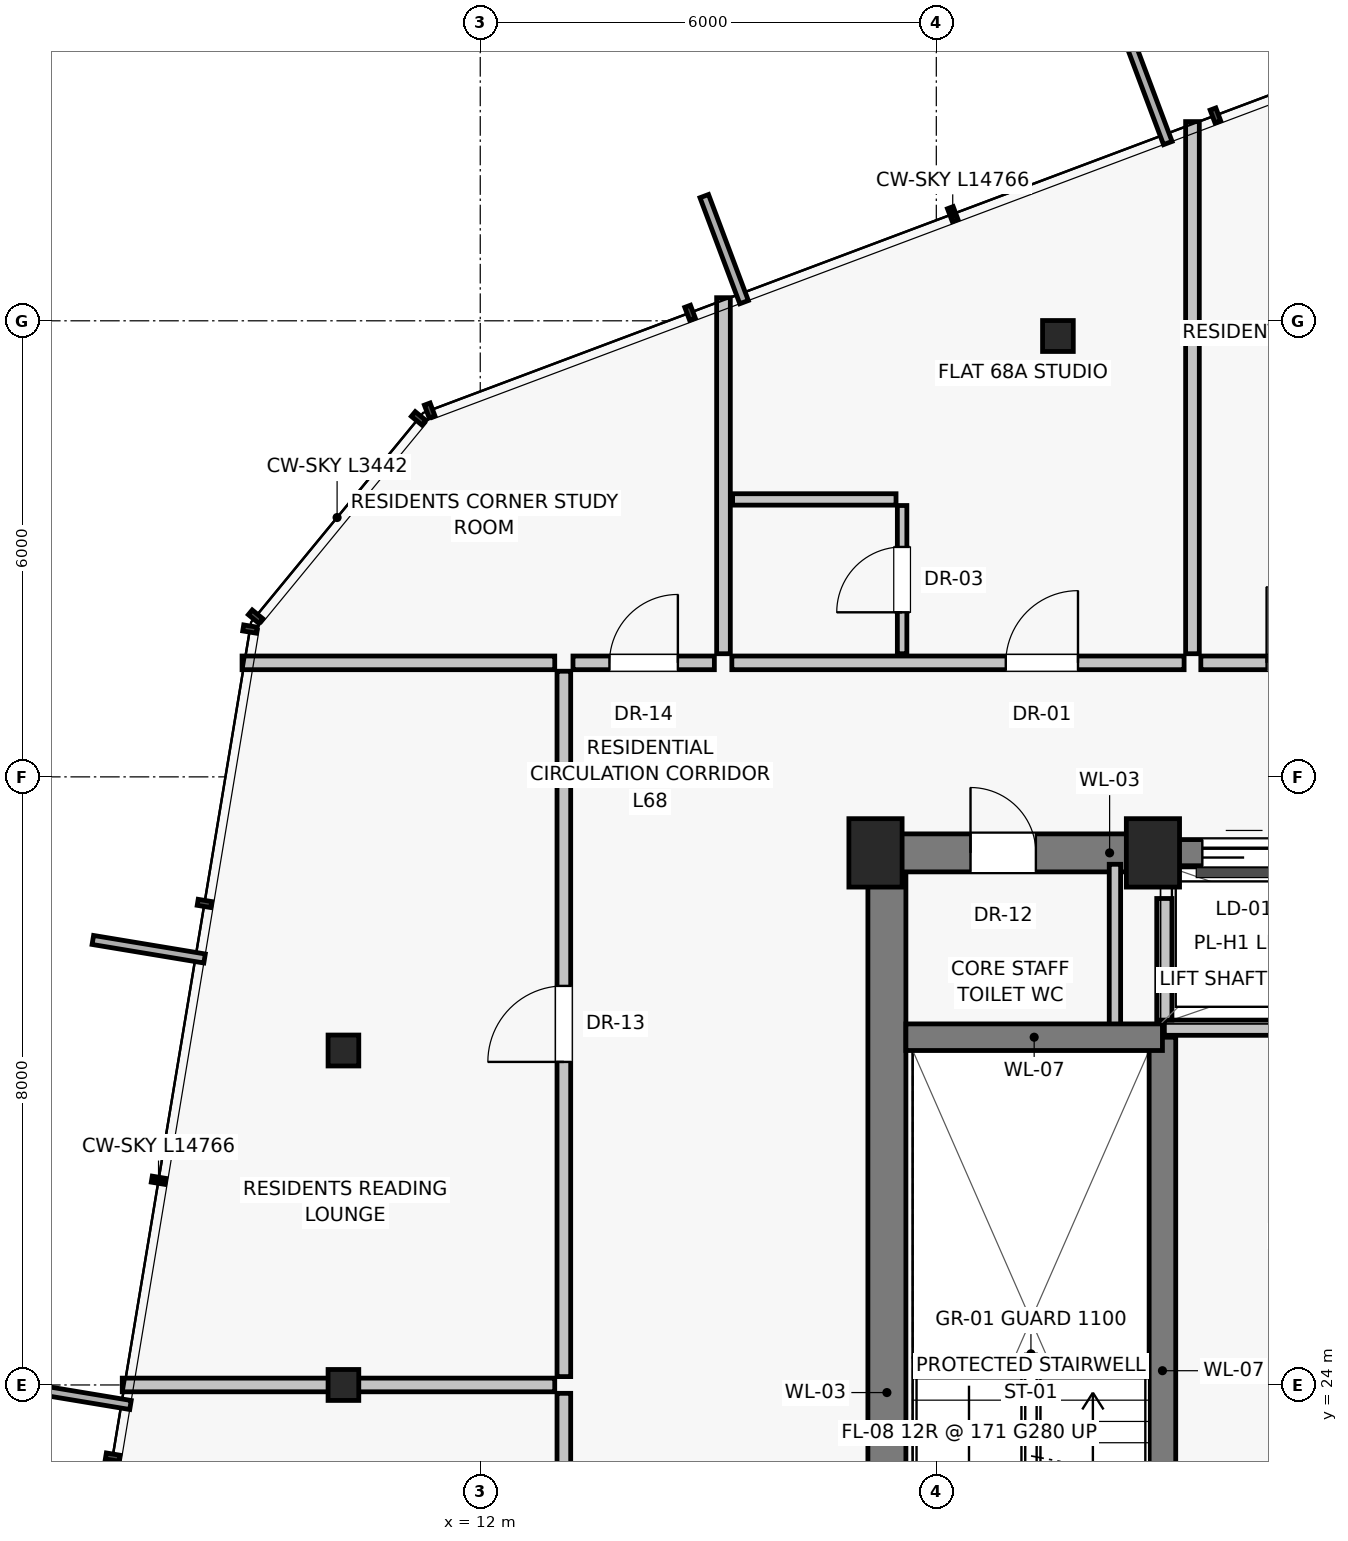
"""IFC4 building model, lengths in metres.
Left out: names, types, materials, properties, quantities, classifications, styles, units other than length and angle.
Written with IfcOpenShell. Run it as: python <this file> out.ifc"""

import sys

from ifc_helpers import new_model, si_unit, direction, frame, frame_2d, origin, origin_2d, place, context, subcontext, project, spatial, rectangle, i_section, extrude, source, transform, mapped, element, fill, save


model = new_model("IFC4")
c1 = context("Model", 3, precision=1e-05, world=origin(), true_north=direction((0.0, 1.0)))
c2 = subcontext(c1, "Body", "Model", "MODEL_VIEW")
j1 = project(units=[si_unit("LENGTHUNIT", "METRE"), si_unit("PLANEANGLEUNIT", "RADIAN")], contexts=[c1])
p1 = place(None, origin())
s1 = spatial("IfcSite", under=j1, at=p1, CompositionType="ELEMENT")
p2 = place(p1, origin())
s2 = spatial("IfcBuilding", under=s1, at=p2, CompositionType="ELEMENT")
p3 = place(p2, frame((0.0, 0.0, 240.65)))
s3 = spatial("IfcBuildingStorey", under=s2, at=p3, CompositionType="ELEMENT", Elevation=240.65)
for number, where, z_axis, x_axis in (
    (1, (17.2, 31.0, 0.0), (0.0, 0.0, 1.0), (1.0, 0.0, 0.0)),
    (2, (20.85, 31.0, 0.0), (0.0, 0.0, 1.0), (1.0, 0.0, 0.0)),
):
    element("IfcColumn", number, at=place(p3, frame(where, z_axis=z_axis, x_axis=x_axis)), inside=s3, PredefinedType="PILASTER", context=c2, shape_type="SweptSolid", body=[
        extrude(rectangle(XDim=0.7, YDim=0.9, at=origin_2d()), origin(), (0.0, 0.0, 1.0), 4.1),
    ])
for number, where, z_axis, x_axis in (
    (3, (19.6, 37.8, 0.0), (0.0, 0.0, 1.0), (1.0, 0.0, 0.0)),
    (4, (10.2, 28.4, 0.0), (0.0, 0.0, 1.0), (1.0, 0.0, 0.0)),
    (5, (10.2, 24.0, 0.0), (0.0, 0.0, 1.0), (1.0, 0.0, 0.0)),
):
    element("IfcColumn", number, at=place(p3, frame(where, z_axis=z_axis, x_axis=x_axis)), inside=s3, PredefinedType="COLUMN", context=c2, shape_type="SweptSolid", body=[
        extrude(i_section(OverallWidth=0.404, OverallDepth=0.407, WebThickness=0.025, FlangeThickness=0.04, at=origin_2d()), origin(), (0.0, 0.0, 1.0), 4.1),
    ])
p4 = place(p3, frame((17.35, 16.8, 0.0), z_axis=(0.0, 0.0, 1.0), x_axis=(0.0, 1.0, 0.0)))
e6 = element("IfcWall", 6, at=p4, inside=s3, PredefinedType="SHEAR", context=c2, shape_type="SweptSolid", body=[
    extrude(rectangle(XDim=14.2, YDim=0.5, at=frame_2d((7.1, 0.0))), origin(), (0.0, 0.0, 1.0), 3.865),
])
p5 = place(p3, frame((17.2, 31.0, 0.0), z_axis=(0.0, 0.0, 1.0), x_axis=(1.0, 0.0, 0.0)))
e7 = element("IfcWall", 7, at=p5, inside=s3, PredefinedType="SHEAR", context=c2, shape_type="SweptSolid", body=[
    extrude(rectangle(XDim=3.8, YDim=0.5, at=frame_2d((1.9, 0.0))), origin(), (0.0, 0.0, 1.0), 3.865),
])
p6 = place(p5, frame((1.25, 0.0, 0.0)))
e8 = element("IfcOpeningElement", 8, at=p6, cuts=e7, PredefinedType="OPENING", context=c2, shape_type="SweptSolid", body=[
    extrude(rectangle(XDim=0.86, YDim=2.01, at=frame_2d((0.43, 1.005))), frame((0.0, 0.26, 0.0), z_axis=(0.0, -1.0, 0.0), x_axis=(1.0, 0.0, 0.0)), (0.0, 0.0, 1.0), 0.52),
])
p7 = place(p3, frame((21.0, 31.0, 0.0), z_axis=(0.0, 0.0, 1.0), x_axis=(1.0, 0.0, 0.0)))
e9 = element("IfcWall", 9, at=p7, inside=s3, PredefinedType="SHEAR", context=c2, shape_type="SweptSolid", body=[
    extrude(rectangle(XDim=6.0, YDim=0.35, at=frame_2d((3.0, 0.0))), origin(), (0.0, 0.0, 1.0), 3.865),
])
p8 = place(p7, frame((0.5, 0.0, 0.0)))
e10 = element("IfcOpeningElement", 10, at=p8, cuts=e9, PredefinedType="OPENING", context=c2, shape_type="SweptSolid", body=[
    extrude(rectangle(XDim=1.1, YDim=2.08, at=frame_2d((0.55, 1.04))), frame((0.0, 0.185, 0.0), z_axis=(0.0, -1.0, 0.0), x_axis=(1.0, 0.0, 0.0)), (0.0, 0.0, 1.0), 0.37),
])
p9 = place(p7, frame((2.45, 0.0, 0.0)))
e11 = element("IfcOpeningElement", 11, at=p9, cuts=e9, PredefinedType="OPENING", context=c2, shape_type="SweptSolid", body=[
    extrude(rectangle(XDim=1.1, YDim=2.08, at=frame_2d((0.55, 1.04))), frame((0.0, 0.185, 0.0), z_axis=(0.0, -1.0, 0.0), x_axis=(1.0, 0.0, 0.0)), (0.0, 0.0, 1.0), 0.37),
])
p10 = place(p7, frame((4.4, 0.0, 0.0)))
e12 = element("IfcOpeningElement", 12, at=p10, cuts=e9, PredefinedType="OPENING", context=c2, shape_type="SweptSolid", body=[
    extrude(rectangle(XDim=1.1, YDim=2.08, at=frame_2d((0.55, 1.04))), frame((0.0, 0.185, 0.0), z_axis=(0.0, -1.0, 0.0), x_axis=(1.0, 0.0, 0.0)), (0.0, 0.0, 1.0), 0.37),
])
p11 = place(p3, frame((20.35, 28.65, 0.0), z_axis=(0.0, 0.0, 1.0), x_axis=(0.0, 1.0, 0.0)))
e13 = element("IfcWall", 13, at=p11, inside=s3, PredefinedType="PARTITIONING", context=c2, shape_type="SweptSolid", body=[
    extrude(rectangle(XDim=2.2, YDim=0.15, at=frame_2d((1.1, 0.0))), origin(), (0.0, 0.0, 1.0), 3.865),
])
p12 = place(p3, frame((20.975, 19.8, 0.0), z_axis=(0.0, 0.0, 1.0), x_axis=(0.0, 1.0, 0.0)))
e14 = element("IfcWall", 14, at=p12, inside=s3, PredefinedType="SHEAR", context=c2, shape_type="SweptSolid", body=[
    extrude(rectangle(XDim=8.775, YDim=0.35, at=frame_2d((4.387, 0.0))), origin(), (0.0, 0.0, 1.0), 3.865),
])
p13 = place(p3, frame((17.6, 28.575, 0.0), z_axis=(0.0, 0.0, 1.0), x_axis=(1.0, 0.0, 0.0)))
e15 = element("IfcWall", 15, at=p13, inside=s3, PredefinedType="SHEAR", context=c2, shape_type="SweptSolid", body=[
    extrude(rectangle(XDim=3.375, YDim=0.35, at=frame_2d((1.688, 0.0))), origin(), (0.0, 0.0, 1.0), 3.865),
])
p14 = place(p3, frame((21.0, 28.7, 0.0), z_axis=(0.0, 0.0, 1.0), x_axis=(1.0, 0.0, 0.0)))
e16 = element("IfcWall", 16, at=p14, inside=s3, PredefinedType="SOLIDWALL", context=c2, shape_type="SweptSolid", body=[
    extrude(rectangle(XDim=6.0, YDim=0.2, at=frame_2d((3.0, 0.0))), origin(), (0.0, 0.0, 1.0), 3.865),
])
p15 = place(p3, frame((21.0, 28.8, 0.0), z_axis=(0.0, 0.0, 1.0), x_axis=(0.0, 1.0, 0.0)))
e17 = element("IfcWall", 17, at=p15, inside=s3, PredefinedType="SOLIDWALL", context=c2, shape_type="SweptSolid", body=[
    extrude(rectangle(XDim=1.6, YDim=0.2, at=frame_2d((0.8, 0.0))), origin(), (0.0, 0.0, 1.0), 3.865),
])
p16 = place(p3, frame((15.2, 33.62, 0.0), z_axis=(0.0, 0.0, 1.0), x_axis=(0.0, 1.0, 0.0)))
e18 = element("IfcWall", 18, at=p16, inside=s3, PredefinedType="PARTITIONING", context=c2, shape_type="SweptSolid", body=[
    extrude(rectangle(XDim=4.684, YDim=0.18, at=frame_2d((2.342, 0.0))), origin(), (0.0, 0.0, 1.0), 3.865),
])
p17 = place(p3, frame((21.48, 33.5, 0.0), z_axis=(0.0, 0.0, 1.0), x_axis=(1.0, 0.0, 0.0)))
e19 = element("IfcWall", 19, at=p17, inside=s3, PredefinedType="PARTITIONING", context=c2, shape_type="SweptSolid", body=[
    extrude(rectangle(XDim=2.73, YDim=0.18, at=frame_2d((1.365, 0.0))), origin(), (0.0, 0.0, 1.0), 3.865),
])
p18 = place(p17, frame((0.865, 0.0, 0.0)))
e20 = element("IfcOpeningElement", 20, at=p18, cuts=e19, PredefinedType="OPENING", context=c2, shape_type="SweptSolid", body=[
    extrude(rectangle(XDim=1.0, YDim=2.01, at=frame_2d((0.5, 1.005))), frame((0.0, 0.1, 0.0), z_axis=(0.0, -1.0, 0.0), x_axis=(1.0, 0.0, 0.0)), (0.0, 0.0, 1.0), 0.2),
])
p19 = place(p3, frame((21.37, 33.62, 0.0), z_axis=(0.0, 0.0, 1.0), x_axis=(0.0, 1.0, 0.0)))
e21 = element("IfcWall", 21, at=p19, inside=s3, PredefinedType="PARTITIONING", context=c2, shape_type="SweptSolid", body=[
    extrude(rectangle(XDim=7.0, YDim=0.18, at=frame_2d((3.5, 0.0))), origin(), (0.0, 0.0, 1.0), 3.865),
])
p20 = place(p3, frame((15.31, 33.5, 0.0), z_axis=(0.0, 0.0, 1.0), x_axis=(1.0, 0.0, 0.0)))
e22 = element("IfcWall", 22, at=p20, inside=s3, PredefinedType="PARTITIONING", context=c2, shape_type="SweptSolid", body=[
    extrude(rectangle(XDim=5.95, YDim=0.18, at=frame_2d((2.975, 0.0))), origin(), (0.0, 0.0, 1.0), 3.865),
])
p21 = place(p20, frame((3.604, 0.0, 0.0)))
e23 = element("IfcOpeningElement", 23, at=p21, cuts=e22, PredefinedType="OPENING", context=c2, shape_type="SweptSolid", body=[
    extrude(rectangle(XDim=0.95, YDim=2.02, at=frame_2d((0.475, 1.01))), frame((0.0, 0.1, 0.0), z_axis=(0.0, -1.0, 0.0), x_axis=(1.0, 0.0, 0.0)), (0.0, 0.0, 1.0), 0.2),
])
p22 = place(p3, frame((17.55, 33.62, 0.0), z_axis=(0.0, 0.0, 1.0), x_axis=(0.0, 1.0, 0.0)))
e24 = element("IfcWall", 24, at=p22, inside=s3, PredefinedType="PARTITIONING", context=c2, shape_type="SweptSolid", body=[
    extrude(rectangle(XDim=1.95, YDim=0.125, at=frame_2d((0.975, 0.0))), origin(), (0.0, 0.0, 1.0), 3.865),
])
p23 = place(p22, frame((0.545, 0.0, 0.0)))
e25 = element("IfcOpeningElement", 25, at=p23, cuts=e24, PredefinedType="OPENING", context=c2, shape_type="SweptSolid", body=[
    extrude(rectangle(XDim=0.86, YDim=2.01, at=frame_2d((0.43, 1.005))), frame((0.0, 0.073, 0.0), z_axis=(0.0, -1.0, 0.0), x_axis=(1.0, 0.0, 0.0)), (0.0, 0.0, 1.0), 0.145),
])
p24 = place(p3, frame((15.32, 35.65, 0.0), z_axis=(0.0, 0.0, 1.0), x_axis=(1.0, 0.0, 0.0)))
e26 = element("IfcWall", 26, at=p24, inside=s3, PredefinedType="PARTITIONING", context=c2, shape_type="SweptSolid", body=[
    extrude(rectangle(XDim=2.15, YDim=0.15, at=frame_2d((1.075, 0.0))), origin(), (0.0, 0.0, 1.0), 3.865),
])
p25 = place(p3, frame((12.98, 33.5, 0.0), z_axis=(0.0, 0.0, 1.0), x_axis=(-1.0, 0.0, 0.0)))
e27 = element("IfcWall", 27, at=p25, inside=s3, PredefinedType="PARTITIONING", context=c2, shape_type="SweptSolid", body=[
    extrude(rectangle(XDim=4.114, YDim=0.18, at=frame_2d((2.057, 0.0))), origin(), (0.0, 0.0, 1.0), 3.865),
])
p26 = place(p3, frame((13.1, 19.26, 0.0), z_axis=(0.0, 0.0, 1.0), x_axis=(0.0, 1.0, 0.0)))
e28 = element("IfcWall", 28, at=p26, inside=s3, PredefinedType="PARTITIONING", context=c2, shape_type="SweptSolid", body=[
    extrude(rectangle(XDim=4.63, YDim=0.18, at=frame_2d((2.315, 0.0))), origin(), (0.0, 0.0, 1.0), 3.512),
])
p27 = place(p26, frame((1.815, 0.0, 0.0)))
e29 = element("IfcOpeningElement", 29, at=p27, cuts=e28, PredefinedType="OPENING", context=c2, shape_type="SweptSolid", body=[
    extrude(rectangle(XDim=1.0, YDim=2.01, at=frame_2d((0.5, 1.005))), frame((0.0, 0.1, 0.0), z_axis=(0.0, -1.0, 0.0), x_axis=(1.0, 0.0, 0.0)), (0.0, 0.0, 1.0), 0.2),
])
p28 = place(p3, frame((13.1, 24.11, 0.0), z_axis=(0.0, 0.0, 1.0), x_axis=(0.0, 1.0, 0.0)))
e30 = element("IfcWall", 30, at=p28, inside=s3, PredefinedType="PARTITIONING", context=c2, shape_type="SweptSolid", body=[
    extrude(rectangle(XDim=9.28, YDim=0.18, at=frame_2d((4.64, 0.0))), origin(), (0.0, 0.0, 1.0), 3.512),
])
p29 = place(p28, frame((4.14, 0.0, 0.0)))
e31 = element("IfcOpeningElement", 31, at=p29, cuts=e30, PredefinedType="OPENING", context=c2, shape_type="SweptSolid", body=[
    extrude(rectangle(XDim=1.0, YDim=2.01, at=frame_2d((0.5, 1.005))), frame((0.0, 0.1, 0.0), z_axis=(0.0, -1.0, 0.0), x_axis=(1.0, 0.0, 0.0)), (0.0, 0.0, 1.0), 0.2),
])
p30 = place(p3, frame((12.98, 24.0, 0.0), z_axis=(0.0, 0.0, 1.0), x_axis=(-1.0, 0.0, 0.0)))
e32 = element("IfcWall", 32, at=p30, inside=s3, PredefinedType="PARTITIONING", context=c2, shape_type="SweptSolid", body=[
    extrude(rectangle(XDim=5.69, YDim=0.18, at=frame_2d((2.845, 0.0))), origin(), (0.0, 0.0, 1.0), 3.865),
])
p31 = place(p3, frame((13.22, 33.5, 0.0), z_axis=(0.0, 0.0, 1.0), x_axis=(1.0, 0.0, 0.0)))
e33 = element("IfcWall", 33, at=p31, inside=s3, PredefinedType="PARTITIONING", context=c2, shape_type="SweptSolid", body=[
    extrude(rectangle(XDim=1.86, YDim=0.18, at=frame_2d((0.93, 0.0))), origin(), (0.0, 0.0, 1.0), 3.865),
])
p32 = place(p31, frame((0.48, 0.0, 0.0)))
e34 = element("IfcOpeningElement", 34, at=p32, cuts=e33, PredefinedType="OPENING", context=c2, shape_type="SweptSolid", body=[
    extrude(rectangle(XDim=0.9, YDim=2.01, at=frame_2d((0.45, 1.005))), frame((0.0, 0.1, 0.0), z_axis=(0.0, -1.0, 0.0), x_axis=(1.0, 0.0, 0.0)), (0.0, 0.0, 1.0), 0.2),
])
m1 = source(origin(), c2, "Body", "SweptSolid", [
    extrude(rectangle(XDim=0.86, YDim=2.01, at=frame_2d((0.43, 1.005))), frame((0.0, 0.025, 0.0), z_axis=(0.0, -1.0, 0.0), x_axis=(1.0, 0.0, 0.0)), (0.0, 0.0, 1.0), 0.05),
])
p33 = place(p6, origin())
e35 = element("IfcDoor", 35, at=p33, inside=s3, OperationType="SINGLE_SWING_LEFT", PredefinedType="DOOR", context=c2, shape_type="MappedRepresentation", body=[
    mapped(m1, transform((0.0, 0.0, 0.0), scale=1.0)),
])
fill(e8, e35)
m2 = source(origin(), c2, "Body", "SweptSolid", [
    extrude(rectangle(XDim=1.1, YDim=2.08, at=frame_2d((0.55, 1.04))), frame((0.0, 0.025, 0.0), z_axis=(0.0, -1.0, 0.0), x_axis=(1.0, 0.0, 0.0)), (0.0, 0.0, 1.0), 0.05),
])
p34 = place(p8, origin())
e36 = element("IfcDoor", 36, at=p34, inside=s3, OperationType="SLIDING_TO_LEFT", PredefinedType="DOOR", context=c2, shape_type="MappedRepresentation", body=[
    mapped(m2, transform((0.0, 0.0, 0.0), scale=1.0)),
])
fill(e10, e36)
m3 = source(origin(), c2, "Body", "SweptSolid", [
    extrude(rectangle(XDim=1.0, YDim=2.01, at=frame_2d((0.5, 1.005))), frame((0.0, 0.025, 0.0), z_axis=(0.0, -1.0, 0.0), x_axis=(1.0, 0.0, 0.0)), (0.0, 0.0, 1.0), 0.05),
])
p35 = place(p18, origin())
e37 = element("IfcDoor", 37, at=p35, inside=s3, OperationType="SINGLE_SWING_LEFT", PredefinedType="DOOR", context=c2, shape_type="MappedRepresentation", body=[
    mapped(m3, transform((0.0, 0.0, 0.0), scale=1.0)),
])
fill(e20, e37)
m4 = source(origin(), c2, "Body", "SweptSolid", [
    extrude(rectangle(XDim=0.95, YDim=2.02, at=frame_2d((0.475, 1.01))), frame((0.0, 0.025, 0.0), z_axis=(0.0, -1.0, 0.0), x_axis=(1.0, 0.0, 0.0)), (0.0, 0.0, 1.0), 0.05),
])
p36 = place(p21, origin())
e38 = element("IfcDoor", 38, at=p36, inside=s3, OperationType="SINGLE_SWING_RIGHT", PredefinedType="DOOR", context=c2, shape_type="MappedRepresentation", body=[
    mapped(m4, transform((0.0, 0.0, 0.0), scale=1.0)),
])
fill(e23, e38)
p37 = place(p23, origin())
e39 = element("IfcDoor", 39, at=p37, inside=s3, OperationType="SINGLE_SWING_LEFT", PredefinedType="DOOR", context=c2, shape_type="MappedRepresentation", body=[
    mapped(m1, transform((0.0, 0.0, 0.0), scale=1.0)),
])
fill(e25, e39)
p38 = place(p29, origin())
e40 = element("IfcDoor", 40, at=p38, inside=s3, OperationType="SINGLE_SWING_LEFT", PredefinedType="DOOR", context=c2, shape_type="MappedRepresentation", body=[
    mapped(m3, transform((0.0, 0.0, 0.0), scale=1.0)),
])
fill(e31, e40)
m5 = source(origin(), c2, "Body", "SweptSolid", [
    extrude(rectangle(XDim=0.9, YDim=2.01, at=frame_2d((0.45, 1.005))), frame((0.0, 0.025, 0.0), z_axis=(0.0, -1.0, 0.0), x_axis=(1.0, 0.0, 0.0)), (0.0, 0.0, 1.0), 0.05),
])
p39 = place(p32, origin())
e41 = element("IfcDoor", 41, at=p39, inside=s3, OperationType="SINGLE_SWING_RIGHT", PredefinedType="DOOR", context=c2, shape_type="MappedRepresentation", body=[
    mapped(m5, transform((0.0, 0.0, 0.0), scale=1.0)),
])
fill(e34, e41)
save(model, sys.argv[1])
